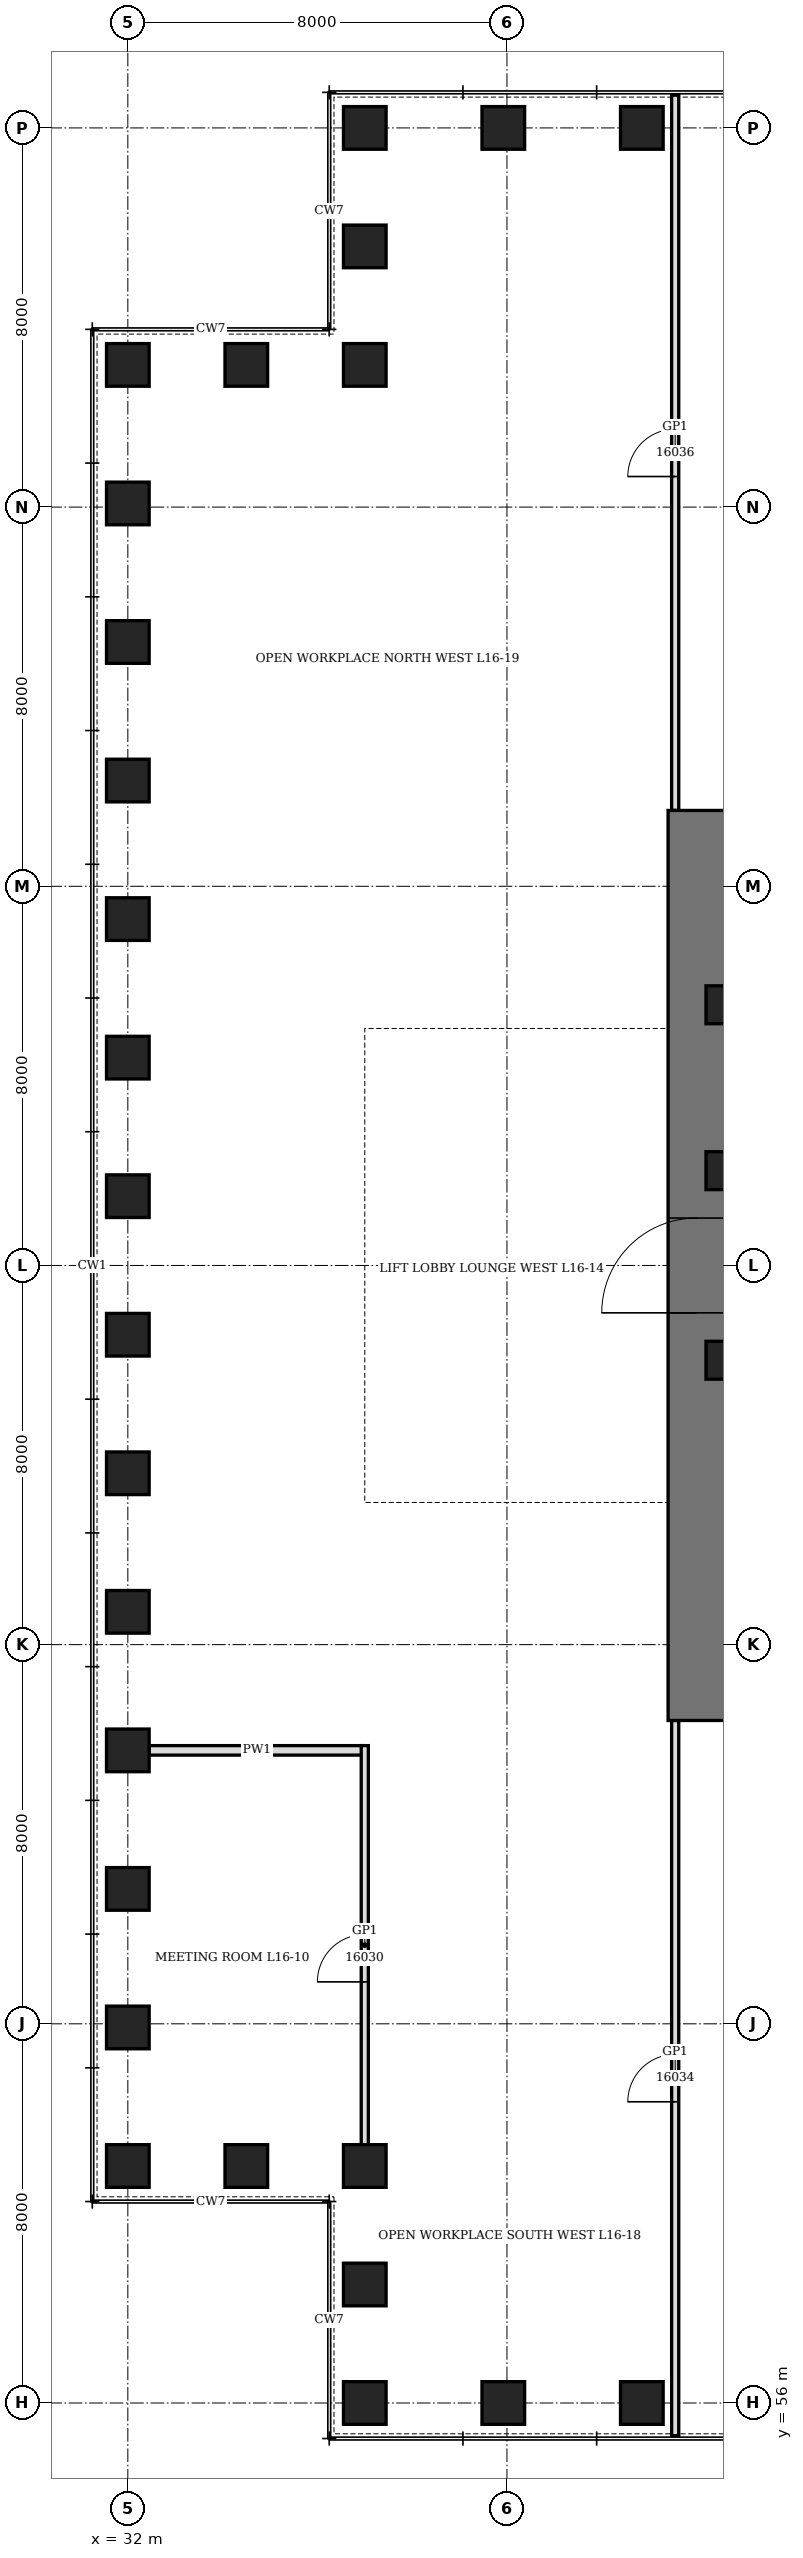
"""IFC4 building model, lengths in metres.
Left out: names, types, materials, properties, quantities, classifications, styles, units other than length and angle.
Written with IfcOpenShell. Run it as: python <this file> out.ifc"""

import sys

from ifc_helpers import new_model, si_unit, direction, frame, frame_2d, origin, origin_2d, place, context, subcontext, project, spatial, rectangle, hollow_rectangle, extrude, element, fill, save


model = new_model("IFC4")
c1 = context("Model", 3, precision=1e-05, world=origin(), true_north=direction((0.0, 1.0)))
c2 = subcontext(c1, "Body", "Model", "MODEL_VIEW")
j1 = project(units=[si_unit("LENGTHUNIT", "METRE"), si_unit("PLANEANGLEUNIT", "RADIAN")], contexts=[c1])
p1 = place(None, origin())
s1 = spatial("IfcSite", under=j1, at=p1, CompositionType="ELEMENT")
p2 = place(p1, origin())
s2 = spatial("IfcBuilding", under=s1, at=p2, CompositionType="ELEMENT")
p3 = place(p2, frame((0.0, 0.0, 76.9)))
s3 = spatial("IfcBuildingStorey", under=s2, at=p3, CompositionType="ELEMENT", Elevation=76.9)
for number, where, z_axis, x_axis in (
    (1, (37.0, 56.0, 0.0), (0.0, 0.0, 1.0), (1.0, 0.0, 0.0)),
    (2, (39.923, 56.0, 0.0), (0.0, 0.0, 1.0), (1.0, 0.0, 0.0)),
    (3, (42.846, 56.0, 0.0), (0.0, 0.0, 1.0), (1.0, 0.0, 0.0)),
    (4, (42.846, 104.0, 0.0), (0.0, 0.0, 1.0), (1.0, 0.0, 0.0)),
    (5, (39.923, 104.0, 0.0), (0.0, 0.0, 1.0), (1.0, 0.0, 0.0)),
    (6, (37.0, 104.0, 0.0), (0.0, 0.0, 1.0), (0.0, 1.0, 0.0)),
    (7, (37.0, 101.5, 0.0), (0.0, 0.0, 1.0), (0.0, 1.0, 0.0)),
    (8, (37.0, 99.0, 0.0), (0.0, 0.0, 1.0), (1.0, 0.0, 0.0)),
    (9, (34.5, 99.0, 0.0), (0.0, 0.0, 1.0), (1.0, 0.0, 0.0)),
    (10, (32.0, 99.0, 0.0), (0.0, 0.0, 1.0), (0.0, 1.0, 0.0)),
    (11, (32.0, 96.077, 0.0), (0.0, 0.0, 1.0), (0.0, 1.0, 0.0)),
    (12, (32.0, 93.154, 0.0), (0.0, 0.0, 1.0), (0.0, 1.0, 0.0)),
    (13, (32.0, 90.231, 0.0), (0.0, 0.0, 1.0), (0.0, 1.0, 0.0)),
    (14, (32.0, 87.308, 0.0), (0.0, 0.0, 1.0), (0.0, 1.0, 0.0)),
    (15, (32.0, 84.385, 0.0), (0.0, 0.0, 1.0), (0.0, 1.0, 0.0)),
    (16, (32.0, 81.461, 0.0), (0.0, 0.0, 1.0), (0.0, 1.0, 0.0)),
    (17, (32.0, 78.539, 0.0), (0.0, 0.0, 1.0), (0.0, 1.0, 0.0)),
    (18, (32.0, 75.615, 0.0), (0.0, 0.0, 1.0), (0.0, 1.0, 0.0)),
    (19, (32.0, 72.692, 0.0), (0.0, 0.0, 1.0), (0.0, 1.0, 0.0)),
    (20, (32.0, 69.769, 0.0), (0.0, 0.0, 1.0), (0.0, 1.0, 0.0)),
    (21, (32.0, 66.846, 0.0), (0.0, 0.0, 1.0), (0.0, 1.0, 0.0)),
    (22, (32.0, 63.923, 0.0), (0.0, 0.0, 1.0), (0.0, 1.0, 0.0)),
    (23, (32.0, 61.0, 0.0), (0.0, 0.0, 1.0), (1.0, 0.0, 0.0)),
    (24, (34.5, 61.0, 0.0), (0.0, 0.0, 1.0), (1.0, 0.0, 0.0)),
    (25, (37.0, 61.0, 0.0), (0.0, 0.0, 1.0), (0.0, 1.0, 0.0)),
    (26, (37.0, 58.5, 0.0), (0.0, 0.0, 1.0), (0.0, 1.0, 0.0)),
):
    element("IfcColumn", number, at=place(p3, frame(where, z_axis=z_axis, x_axis=x_axis)), inside=s3, PredefinedType="COLUMN", context=c2, shape_type="SweptSolid", body=[
        extrude(hollow_rectangle(XDim=0.9, YDim=0.9, WallThickness=0.12, at=origin_2d()), origin(), (0.0, 0.0, 1.0), 4.2),
    ])
p4 = place(p3, frame((44.0, 70.4, 0.0), z_axis=(0.0, 0.0, 1.0), x_axis=(0.0, 1.0, 0.0)))
e27 = element("IfcWall", 27, at=p4, inside=s3, PredefinedType="SHEAR", context=c2, shape_type="SweptSolid", body=[
    extrude(rectangle(XDim=19.2, YDim=1.2, at=frame_2d((9.6, 0.0))), origin(), (0.0, 0.0, 1.0), 4.2),
])
p5 = place(p4, frame((8.6, 0.0, 0.0)))
e28 = element("IfcOpeningElement", 28, at=p5, cuts=e27, PredefinedType="OPENING", context=c2, shape_type="SweptSolid", body=[
    extrude(rectangle(XDim=2.0, YDim=2.4, at=frame_2d((1.0, 1.2))), frame((0.0, 0.61, 0.0), z_axis=(0.0, -1.0, 0.0), x_axis=(1.0, 0.0, 0.0)), (0.0, 0.0, 1.0), 1.22),
])
for number, where, z_axis, x_axis in (
    (29, (44.6, 78.0, 0.0), (0.0, 0.0, 1.0), (1.0, 0.0, 0.0)),
    (30, (44.6, 82.0, 0.0), (0.0, 0.0, 1.0), (1.0, 0.0, 0.0)),
    (31, (44.6, 85.5, 0.0), (0.0, 0.0, 1.0), (1.0, 0.0, 0.0)),
):
    element("IfcColumn", number, at=place(p3, frame(where, z_axis=z_axis, x_axis=x_axis)), inside=s3, PredefinedType="COLUMN", context=c2, shape_type="SweptSolid", body=[
        extrude(hollow_rectangle(XDim=0.8, YDim=0.8, WallThickness=0.1, at=origin_2d()), origin(), (0.0, 0.0, 1.0), 4.2),
    ])
p6 = place(p3, frame((32.45, 69.769, 0.0), z_axis=(0.0, 0.0, 1.0), x_axis=(1.0, 0.0, 0.0)))
e32 = element("IfcWall", 32, at=p6, inside=s3, PredefinedType="PARTITIONING", context=c2, shape_type="SweptSolid", body=[
    extrude(rectangle(XDim=4.55, YDim=0.2, at=frame_2d((2.275, 0.0))), origin(), (0.0, 0.0, 1.0), 3.428),
])
p7 = place(p3, frame((37.0, 61.45, 0.0), z_axis=(0.0, 0.0, 1.0), x_axis=(0.0, 1.0, 0.0)))
e33 = element("IfcWall", 33, at=p7, inside=s3, PredefinedType="PARTITIONING", context=c2, shape_type="SweptSolid", body=[
    extrude(rectangle(XDim=8.419, YDim=0.15, at=frame_2d((4.209, 0.0))), origin(), (0.0, 0.0, 1.0), 4.04),
])
p8 = place(p7, frame((3.435, 0.0, 0.0)))
e34 = element("IfcOpeningElement", 34, at=p8, cuts=e33, PredefinedType="OPENING", context=c2, shape_type="SweptSolid", body=[
    extrude(rectangle(XDim=1.0, YDim=2.4, at=frame_2d((0.5, 1.2))), frame((0.0, 0.085, 0.0), z_axis=(0.0, -1.0, 0.0), x_axis=(1.0, 0.0, 0.0)), (0.0, 0.0, 1.0), 0.17),
])
p9 = place(p3, frame((43.55, 55.31, 0.0), z_axis=(0.0, 0.0, 1.0), x_axis=(0.0, 1.0, 0.0)))
e35 = element("IfcWall", 35, at=p9, inside=s3, PredefinedType="PARTITIONING", context=c2, shape_type="SweptSolid", body=[
    extrude(rectangle(XDim=15.09, YDim=0.15, at=frame_2d((7.545, 0.0))), origin(), (0.0, 0.0, 1.0), 4.04),
])
p10 = place(p9, frame((7.045, 0.0, 0.0)))
e36 = element("IfcOpeningElement", 36, at=p10, cuts=e35, PredefinedType="OPENING", context=c2, shape_type="SweptSolid", body=[
    extrude(rectangle(XDim=1.0, YDim=2.4, at=frame_2d((0.5, 1.2))), frame((0.0, 0.085, 0.0), z_axis=(0.0, -1.0, 0.0), x_axis=(1.0, 0.0, 0.0)), (0.0, 0.0, 1.0), 0.17),
])
p11 = place(p3, frame((43.55, 89.6, 0.0), z_axis=(0.0, 0.0, 1.0), x_axis=(0.0, 1.0, 0.0)))
e37 = element("IfcWall", 37, at=p11, inside=s3, PredefinedType="PARTITIONING", context=c2, shape_type="SweptSolid", body=[
    extrude(rectangle(XDim=15.09, YDim=0.15, at=frame_2d((7.545, 0.0))), origin(), (0.0, 0.0, 1.0), 4.04),
])
p12 = place(p11, frame((7.045, 0.0, 0.0)))
e38 = element("IfcOpeningElement", 38, at=p12, cuts=e37, PredefinedType="OPENING", context=c2, shape_type="SweptSolid", body=[
    extrude(rectangle(XDim=1.0, YDim=2.4, at=frame_2d((0.5, 1.2))), frame((0.0, 0.085, 0.0), z_axis=(0.0, -1.0, 0.0), x_axis=(1.0, 0.0, 0.0)), (0.0, 0.0, 1.0), 0.17),
])
p13 = place(p5, origin())
e39 = element("IfcDoor", 39, at=p13, inside=s3, OperationType="DOUBLE_DOOR_SINGLE_SWING", PredefinedType="DOOR", context=c2, shape_type="SweptSolid", body=[
    extrude(rectangle(XDim=2.0, YDim=2.4, at=frame_2d((1.0, 1.2))), frame((0.0, 0.35, 0.0), z_axis=(0.0, -1.0, 0.0), x_axis=(1.0, 0.0, 0.0)), (0.0, 0.0, 1.0), 0.7),
])
fill(e28, e39)
p14 = place(p8, origin())
e40 = element("IfcDoor", 40, at=p14, inside=s3, OperationType="SINGLE_SWING_RIGHT", PredefinedType="DOOR", context=c2, shape_type="SweptSolid", body=[
    extrude(rectangle(XDim=1.0, YDim=2.4, at=frame_2d((0.5, 1.2))), frame((0.0, 0.075, 0.0), z_axis=(0.0, -1.0, 0.0), x_axis=(1.0, 0.0, 0.0)), (0.0, 0.0, 1.0), 0.149),
])
fill(e34, e40)
p15 = place(p10, origin())
e41 = element("IfcDoor", 41, at=p15, inside=s3, OperationType="SINGLE_SWING_RIGHT", PredefinedType="DOOR", context=c2, shape_type="SweptSolid", body=[
    extrude(rectangle(XDim=1.0, YDim=2.4, at=frame_2d((0.5, 1.2))), frame((0.0, 0.075, 0.0), z_axis=(0.0, -1.0, 0.0), x_axis=(1.0, 0.0, 0.0)), (0.0, 0.0, 1.0), 0.149),
])
fill(e36, e41)
p16 = place(p12, origin())
e42 = element("IfcDoor", 42, at=p16, inside=s3, OperationType="SINGLE_SWING_RIGHT", PredefinedType="DOOR", context=c2, shape_type="SweptSolid", body=[
    extrude(rectangle(XDim=1.0, YDim=2.4, at=frame_2d((0.5, 1.2))), frame((0.0, 0.075, 0.0), z_axis=(0.0, -1.0, 0.0), x_axis=(1.0, 0.0, 0.0)), (0.0, 0.0, 1.0), 0.149),
])
fill(e38, e42)
save(model, sys.argv[1])
